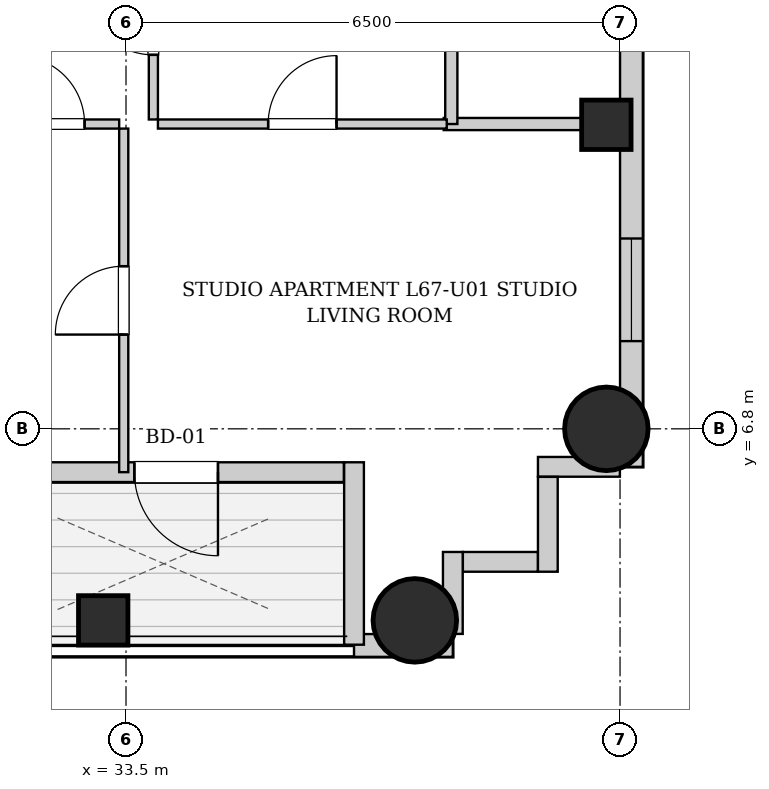
"""IFC4 building model, lengths in metres.
Left out: names, types, materials, properties, quantities, classifications, styles, units other than length and angle.
Written with IfcOpenShell. Run it as: python <this file> out.ifc"""

import sys

from ifc_helpers import new_model, si_unit, direction, frame, frame_2d, origin, origin_2d, place, context, subcontext, project, spatial, rectangle, circle, extrude, element, fill, save


model = new_model("IFC4")
c1 = context("Model", 3, precision=1e-05, world=origin(), true_north=direction((0.0, 1.0)))
c2 = subcontext(c1, "Body", "Model", "MODEL_VIEW")
j1 = project(units=[si_unit("LENGTHUNIT", "METRE"), si_unit("PLANEANGLEUNIT", "RADIAN")], contexts=[c1])
p1 = place(None, origin())
s1 = spatial("IfcSite", under=j1, at=p1, CompositionType="ELEMENT")
p2 = place(p1, origin())
s2 = spatial("IfcBuilding", under=s1, at=p2, CompositionType="ELEMENT")
p3 = place(p2, frame((0.0, 0.0, 230.9)))
s3 = spatial("IfcBuildingStorey", under=s2, at=p3, CompositionType="ELEMENT", Elevation=230.9)
p4 = place(p3, frame((33.2, 4.28, 0.0), z_axis=(0.0, 0.0, 1.0), x_axis=(1.0, 0.0, 0.0)))
e1 = element("IfcColumn", 1, at=p4, inside=s3, PredefinedType="COLUMN", context=c2, shape_type="SweptSolid", body=[
    extrude(rectangle(XDim=0.65, YDim=0.65, at=origin_2d()), origin(), (0.0, 0.0, 1.0), 3.4),
])
for number, where, z_axis, x_axis in (
    (2, (37.3, 4.28, 0.0), (0.0, 0.0, 1.0), (1.0, 0.0, 0.0)),
    (3, (39.82, 6.8, 0.0), (0.0, 0.0, 1.0), (1.0, 0.0, 0.0)),
):
    element("IfcColumn", number, at=place(p3, frame(where, z_axis=z_axis, x_axis=x_axis)), inside=s3, PredefinedType="COLUMN", context=c2, shape_type="SweptSolid", body=[
        extrude(circle(Radius=0.55, at=origin_2d()), origin(), (0.0, 0.0, 1.0), 3.4),
    ])
p5 = place(p3, frame((39.82, 10.8, 0.0), z_axis=(0.0, 0.0, 1.0), x_axis=(1.0, 0.0, 0.0)))
e4 = element("IfcColumn", 4, at=p5, inside=s3, PredefinedType="COLUMN", context=c2, shape_type="SweptSolid", body=[
    extrude(rectangle(XDim=0.65, YDim=0.65, at=origin_2d()), origin(), (0.0, 0.0, 1.0), 3.4),
])
p6 = place(p3, frame((40.15, 37.7, 0.0), z_axis=(0.0, 0.0, 1.0), x_axis=(0.0, -1.0, 0.0)))
e5 = element("IfcWall", 5, at=p6, inside=s3, PredefinedType="SOLIDWALL", context=c2, shape_type="SweptSolid", body=[
    extrude(rectangle(XDim=31.4, YDim=0.3, at=frame_2d((15.7, 0.0))), origin(), (0.0, 0.0, 1.0), 3.14),
])
p7 = place(p6, frame((28.396, 0.0, 0.55)))
e6 = element("IfcOpeningElement", 6, at=p7, cuts=e5, PredefinedType="OPENING", context=c2, shape_type="SweptSolid", body=[
    extrude(rectangle(XDim=1.35, YDim=1.2, at=frame_2d((0.675, 0.6))), frame((0.0, 0.16, 0.0), z_axis=(0.0, -1.0, 0.0), x_axis=(1.0, 0.0, 0.0)), (0.0, 0.0, 1.0), 0.32),
])
p8 = place(p6, frame((1.653, 0.0, 0.55)))
e7 = element("IfcOpeningElement", 7, at=p8, cuts=e5, PredefinedType="OPENING", context=c2, shape_type="SweptSolid", body=[
    extrude(rectangle(XDim=1.35, YDim=1.2, at=frame_2d((0.675, 0.6))), frame((0.0, 0.16, 0.0), z_axis=(0.0, -1.0, 0.0), x_axis=(1.0, 0.0, 0.0)), (0.0, 0.0, 1.0), 0.32),
])
p9 = place(p6, frame((19.683, 0.0, 0.55)))
e8 = element("IfcOpeningElement", 8, at=p9, cuts=e5, PredefinedType="OPENING", context=c2, shape_type="SweptSolid", body=[
    extrude(rectangle(XDim=1.35, YDim=1.2, at=frame_2d((0.675, 0.6))), frame((0.0, 0.16, 0.0), z_axis=(0.0, -1.0, 0.0), x_axis=(1.0, 0.0, 0.0)), (0.0, 0.0, 1.0), 0.32),
])
p10 = place(p6, frame((10.367, 0.0, 0.55)))
e9 = element("IfcOpeningElement", 9, at=p10, cuts=e5, PredefinedType="OPENING", context=c2, shape_type="SweptSolid", body=[
    extrude(rectangle(XDim=1.35, YDim=1.2, at=frame_2d((0.675, 0.6))), frame((0.0, 0.16, 0.0), z_axis=(0.0, -1.0, 0.0), x_axis=(1.0, 0.0, 0.0)), (0.0, 0.0, 1.0), 0.32),
])
p11 = place(p3, frame((37.8, 3.95, 0.0), z_axis=(0.0, 0.0, 1.0), x_axis=(-1.0, 0.0, 0.0)))
e10 = element("IfcWall", 10, at=p11, inside=s3, PredefinedType="SOLIDWALL", context=c2, shape_type="SweptSolid", body=[
    extrude(rectangle(XDim=1.3, YDim=0.3, at=frame_2d((0.65, 0.0))), origin(), (0.0, 0.0, 1.0), 3.14),
])
p12 = place(p3, frame((36.5, 3.96, 0.0), z_axis=(0.0, 0.0, 1.0), x_axis=(0.0, 1.0, 0.0)))
e11 = element("IfcWall", 11, at=p12, inside=s3, PredefinedType="SOLIDWALL", context=c2, shape_type="SweptSolid", body=[
    extrude(rectangle(XDim=2.4, YDim=0.26, at=frame_2d((1.2, 0.0))), origin(), (0.0, 0.0, 1.0), 3.14),
])
p13 = place(p3, frame((36.366, 6.23, 0.0), z_axis=(0.0, 0.0, 1.0), x_axis=(-1.0, 0.0, 0.0)))
e12 = element("IfcWall", 12, at=p13, inside=s3, PredefinedType="SOLIDWALL", context=c2, shape_type="SweptSolid", body=[
    extrude(rectangle(XDim=4.732, YDim=0.26, at=frame_2d((2.366, 0.0))), origin(), (0.0, 0.0, 1.0), 3.14),
])
p14 = place(p13, frame((1.656, 0.0, 0.0)))
e13 = element("IfcOpeningElement", 13, at=p14, cuts=e12, PredefinedType="OPENING", context=c2, shape_type="SweptSolid", body=[
    extrude(rectangle(XDim=1.1, YDim=2.0, at=frame_2d((0.55, 1.0))), frame((0.0, 0.14, 0.0), z_axis=(0.0, -1.0, 0.0), x_axis=(1.0, 0.0, 0.0)), (0.0, 0.0, 1.0), 0.28),
])
p15 = place(p3, frame((39.998, 6.3, 0.0), z_axis=(0.0, 0.0, 1.0), x_axis=(-1.0, 0.0, 0.0)))
e14 = element("IfcWall", 14, at=p15, inside=s3, PredefinedType="SOLIDWALL", context=c2, shape_type="SweptSolid", body=[
    extrude(rectangle(XDim=1.078, YDim=0.26, at=frame_2d((0.539, 0.0))), origin(), (0.0, 0.0, 1.0), 3.14),
])
p16 = place(p3, frame((39.05, 6.168, 0.0), z_axis=(0.0, 0.0, 1.0), x_axis=(0.0, -1.0, 0.0)))
e15 = element("IfcWall", 15, at=p16, inside=s3, PredefinedType="SOLIDWALL", context=c2, shape_type="SweptSolid", body=[
    extrude(rectangle(XDim=1.248, YDim=0.26, at=frame_2d((0.624, 0.0))), origin(), (0.0, 0.0, 1.0), 3.14),
])
p17 = place(p3, frame((38.918, 5.05, 0.0), z_axis=(0.0, 0.0, 1.0), x_axis=(-1.0, 0.0, 0.0)))
e16 = element("IfcWall", 16, at=p17, inside=s3, PredefinedType="SOLIDWALL", context=c2, shape_type="SweptSolid", body=[
    extrude(rectangle(XDim=0.986, YDim=0.26, at=frame_2d((0.493, 0.0))), origin(), (0.0, 0.0, 1.0), 3.14),
])
p18 = place(p3, frame((37.8, 5.18, 0.0), z_axis=(0.0, 0.0, 1.0), x_axis=(0.0, -1.0, 0.0)))
e17 = element("IfcWall", 17, at=p18, inside=s3, PredefinedType="SOLIDWALL", context=c2, shape_type="SweptSolid", body=[
    extrude(rectangle(XDim=1.078, YDim=0.26, at=frame_2d((0.539, 0.0))), origin(), (0.0, 0.0, 1.0), 3.14),
])
p19 = place(p3, frame((37.68, 10.81, 0.0), z_axis=(0.0, 0.0, 1.0), x_axis=(1.0, 0.0, 0.0)))
e18 = element("IfcWall", 18, at=p19, inside=s3, PredefinedType="PARTITIONING", context=c2, shape_type="SweptSolid", body=[
    extrude(rectangle(XDim=2.34, YDim=0.16, at=frame_2d((1.17, 0.0))), origin(), (0.0, 0.0, 1.0), 3.14),
])
p20 = place(p3, frame((37.78, 10.81, 0.0), z_axis=(0.0, 0.0, 1.0), x_axis=(0.0, 1.0, 0.0)))
e19 = element("IfcWall", 19, at=p20, inside=s3, PredefinedType="PARTITIONING", context=c2, shape_type="SweptSolid", body=[
    extrude(rectangle(XDim=2.66, YDim=0.16, at=frame_2d((1.33, 0.0))), origin(), (0.0, 0.0, 1.0), 3.14),
])
p21 = place(p3, frame((33.86, 10.87, 0.0), z_axis=(0.0, 0.0, 1.0), x_axis=(0.0, 1.0, 0.0)))
e20 = element("IfcWall", 20, at=p21, inside=s3, PredefinedType="PARTITIONING", context=c2, shape_type="SweptSolid", body=[
    extrude(rectangle(XDim=2.6, YDim=0.12, at=frame_2d((1.3, 0.0))), origin(), (0.0, 0.0, 1.0), 3.14),
])
p22 = place(p21, frame((0.85, 0.0, 0.0)))
e21 = element("IfcOpeningElement", 21, at=p22, cuts=e20, PredefinedType="OPENING", context=c2, shape_type="SweptSolid", body=[
    extrude(rectangle(XDim=0.9, YDim=2.05, at=frame_2d((0.45, 1.025))), frame((0.0, 0.07, 0.0), z_axis=(0.0, -1.0, 0.0), x_axis=(1.0, 0.0, 0.0)), (0.0, 0.0, 1.0), 0.14),
])
p23 = place(p3, frame((31.6, 10.81, 0.0), z_axis=(0.0, 0.0, 1.0), x_axis=(1.0, 0.0, 0.0)))
e22 = element("IfcWall", 22, at=p23, inside=s3, PredefinedType="PARTITIONING", context=c2, shape_type="SweptSolid", body=[
    extrude(rectangle(XDim=1.81, YDim=0.12, at=frame_2d((0.905, 0.0))), origin(), (0.0, 0.0, 1.0), 3.14),
])
p24 = place(p23, frame((0.455, 0.0, 0.0)))
e23 = element("IfcOpeningElement", 23, at=p24, cuts=e22, PredefinedType="OPENING", context=c2, shape_type="SweptSolid", body=[
    extrude(rectangle(XDim=0.9, YDim=2.05, at=frame_2d((0.45, 1.025))), frame((0.0, 0.07, 0.0), z_axis=(0.0, -1.0, 0.0), x_axis=(1.0, 0.0, 0.0)), (0.0, 0.0, 1.0), 0.14),
])
p25 = place(p3, frame((33.92, 10.81, 0.0), z_axis=(0.0, 0.0, 1.0), x_axis=(1.0, 0.0, 0.0)))
e24 = element("IfcWall", 24, at=p25, inside=s3, PredefinedType="PARTITIONING", context=c2, shape_type="SweptSolid", body=[
    extrude(rectangle(XDim=3.8, YDim=0.12, at=frame_2d((1.9, 0.0))), origin(), (0.0, 0.0, 1.0), 3.14),
])
p26 = place(p25, frame((1.45, 0.0, 0.0)))
e25 = element("IfcOpeningElement", 25, at=p26, cuts=e24, PredefinedType="OPENING", context=c2, shape_type="SweptSolid", body=[
    extrude(rectangle(XDim=0.9, YDim=2.05, at=frame_2d((0.45, 1.025))), frame((0.0, 0.07, 0.0), z_axis=(0.0, -1.0, 0.0), x_axis=(1.0, 0.0, 0.0)), (0.0, 0.0, 1.0), 0.14),
])
p27 = place(p3, frame((33.47, 6.23, 0.0), z_axis=(0.0, 0.0, 1.0), x_axis=(0.0, 1.0, 0.0)))
e26 = element("IfcWall", 26, at=p27, inside=s3, PredefinedType="PARTITIONING", context=c2, shape_type="SweptSolid", body=[
    extrude(rectangle(XDim=4.52, YDim=0.12, at=frame_2d((2.26, 0.0))), origin(), (0.0, 0.0, 1.0), 3.14),
])
p28 = place(p27, frame((1.81, 0.0, 0.0)))
e27 = element("IfcOpeningElement", 27, at=p28, cuts=e26, PredefinedType="OPENING", context=c2, shape_type="SweptSolid", body=[
    extrude(rectangle(XDim=0.9, YDim=2.05, at=frame_2d((0.45, 1.025))), frame((0.0, 0.07, 0.0), z_axis=(0.0, -1.0, 0.0), x_axis=(1.0, 0.0, 0.0)), (0.0, 0.0, 1.0), 0.14),
])
p29 = place(p22, origin())
e28 = element("IfcDoor", 28, at=p29, inside=s3, OperationType="SINGLE_SWING_RIGHT", PredefinedType="DOOR", context=c2, shape_type="SweptSolid", body=[
    extrude(rectangle(XDim=0.9, YDim=2.05, at=frame_2d((0.45, 1.025))), frame((0.0, 0.025, 0.0), z_axis=(0.0, -1.0, 0.0), x_axis=(1.0, 0.0, 0.0)), (0.0, 0.0, 1.0), 0.05),
])
fill(e21, e28)
p30 = place(p24, origin())
e29 = element("IfcDoor", 29, at=p30, inside=s3, OperationType="SINGLE_SWING_LEFT", PredefinedType="DOOR", context=c2, shape_type="SweptSolid", body=[
    extrude(rectangle(XDim=0.9, YDim=2.05, at=frame_2d((0.45, 1.025))), frame((0.0, 0.025, 0.0), z_axis=(0.0, -1.0, 0.0), x_axis=(1.0, 0.0, 0.0)), (0.0, 0.0, 1.0), 0.05),
])
fill(e23, e29)
p31 = place(p26, origin())
e30 = element("IfcDoor", 30, at=p31, inside=s3, OperationType="SINGLE_SWING_RIGHT", PredefinedType="DOOR", context=c2, shape_type="SweptSolid", body=[
    extrude(rectangle(XDim=0.9, YDim=2.05, at=frame_2d((0.45, 1.025))), frame((0.0, 0.025, 0.0), z_axis=(0.0, -1.0, 0.0), x_axis=(1.0, 0.0, 0.0)), (0.0, 0.0, 1.0), 0.05),
])
fill(e25, e30)
p32 = place(p28, origin())
e31 = element("IfcDoor", 31, at=p32, inside=s3, OperationType="SINGLE_SWING_LEFT", PredefinedType="DOOR", context=c2, shape_type="SweptSolid", body=[
    extrude(rectangle(XDim=0.9, YDim=2.05, at=frame_2d((0.45, 1.025))), frame((0.0, 0.025, 0.0), z_axis=(0.0, -1.0, 0.0), x_axis=(1.0, 0.0, 0.0)), (0.0, 0.0, 1.0), 0.05),
])
fill(e27, e31)
p33 = place(p14, origin())
e32 = element("IfcDoor", 32, at=p33, inside=s3, OperationType="SINGLE_SWING_LEFT", PredefinedType="DOOR", context=c2, shape_type="SweptSolid", body=[
    extrude(rectangle(XDim=1.1, YDim=2.0, at=frame_2d((0.55, 1.0))), frame((0.0, 0.025, 0.0), z_axis=(0.0, -1.0, 0.0), x_axis=(1.0, 0.0, 0.0)), (0.0, 0.0, 1.0), 0.05),
])
fill(e13, e32)
p34 = place(p7, origin())
e33 = element("IfcWindow", 33, at=p34, inside=s3, PartitioningType="SINGLE_PANEL", PredefinedType="WINDOW", context=c2, shape_type="SweptSolid", body=[
    extrude(rectangle(XDim=1.35, YDim=1.2, at=frame_2d((0.675, 0.6))), frame((0.0, 0.03, 0.0), z_axis=(0.0, -1.0, 0.0), x_axis=(1.0, 0.0, 0.0)), (0.0, 0.0, 1.0), 0.06),
])
fill(e6, e33)
save(model, sys.argv[1])
